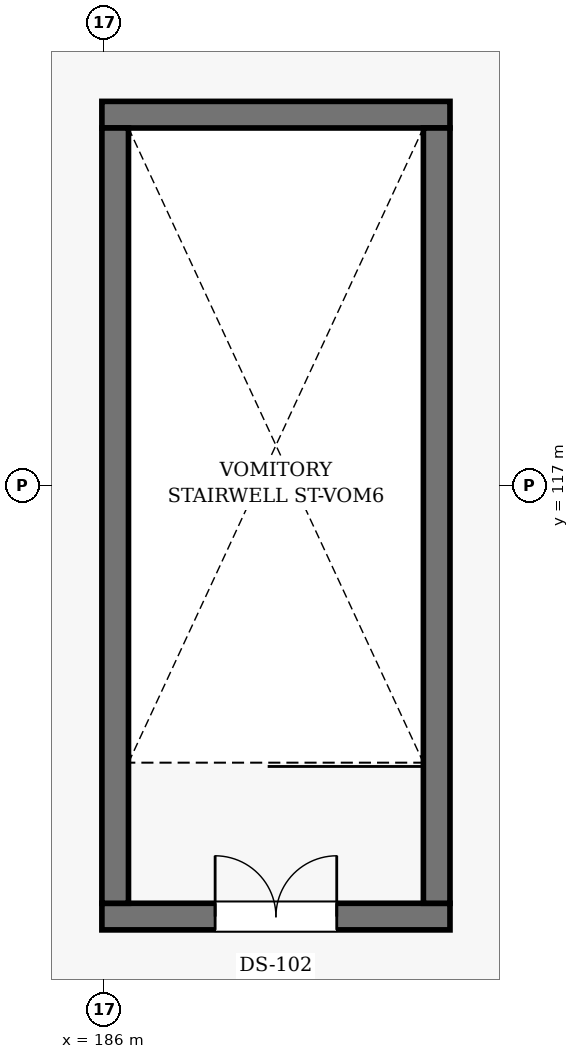
"""IFC4 building model, lengths in metres.
Left out: names, types, materials, properties, quantities, classifications, styles, units other than length and angle.
Written with IfcOpenShell. Run it as: python <this file> out.ifc"""

import sys

from ifc_helpers import new_model, si_unit, direction, frame, frame_2d, origin, place, context, subcontext, project, spatial, rectangle, extrude, element, fill, save


model = new_model("IFC4")
c1 = context("Model", 3, precision=1e-05, world=origin(), true_north=direction((0.0, 1.0)))
c2 = subcontext(c1, "Body", "Model", "MODEL_VIEW")
j1 = project(units=[si_unit("LENGTHUNIT", "METRE"), si_unit("PLANEANGLEUNIT", "RADIAN")], contexts=[c1])
p1 = place(None, origin())
s1 = spatial("IfcSite", under=j1, at=p1, CompositionType="ELEMENT")
p2 = place(p1, origin())
s2 = spatial("IfcBuilding", under=s1, at=p2, CompositionType="ELEMENT")
p3 = place(p2, frame((0.0, 0.0, 5.4)))
s3 = spatial("IfcBuildingStorey", under=s2, at=p3, CompositionType="ELEMENT", Elevation=5.4)
p4 = place(p3, frame((185.97, 111.325, 0.0), z_axis=(0.0, 0.0, 1.0), x_axis=(1.0, 0.0, 0.0)))
e1 = element("IfcWall", 1, at=p4, inside=s3, PredefinedType="SHEAR", context=c2, shape_type="SweptSolid", body=[
    extrude(rectangle(XDim=4.58, YDim=0.35, at=frame_2d((2.29, 0.0))), origin(), (0.0, 0.0, 1.0), 5.4),
])
p5 = place(p4, frame((1.49, 0.0, 0.0)))
e2 = element("IfcOpeningElement", 2, at=p5, cuts=e1, PredefinedType="OPENING", context=c2, shape_type="SweptSolid", body=[
    extrude(rectangle(XDim=1.6, YDim=2.2, at=frame_2d((0.8, 1.1))), frame((0.0, 0.185, 0.0), z_axis=(0.0, -1.0, 0.0), x_axis=(1.0, 0.0, 0.0)), (0.0, 0.0, 1.0), 0.37),
])
p6 = place(p3, frame((190.55, 121.875, 0.0), z_axis=(0.0, 0.0, 1.0), x_axis=(-1.0, 0.0, 0.0)))
e3 = element("IfcWall", 3, at=p6, inside=s3, PredefinedType="SHEAR", context=c2, shape_type="SweptSolid", body=[
    extrude(rectangle(XDim=4.58, YDim=0.35, at=frame_2d((2.29, 0.0))), origin(), (0.0, 0.0, 1.0), 5.4),
])
for number, where, z_axis, x_axis in (
    (4, (186.145, 121.7, 0.0), (0.0, 0.0, 1.0), (0.0, -1.0, 0.0)),
    (5, (190.375, 111.5, 0.0), (0.0, 0.0, 1.0), (0.0, 1.0, 0.0)),
):
    element("IfcWall", number, at=place(p3, frame(where, z_axis=z_axis, x_axis=x_axis)), inside=s3, PredefinedType="SHEAR", context=c2, shape_type="SweptSolid", body=[
        extrude(rectangle(XDim=10.2, YDim=0.35, at=frame_2d((5.1, 0.0))), origin(), (0.0, 0.0, 1.0), 5.4),
    ])
p7 = place(p5, origin())
e6 = element("IfcDoor", 6, at=p7, inside=s3, OperationType="DOUBLE_DOOR_SINGLE_SWING", PredefinedType="DOOR", context=c2, shape_type="SweptSolid", body=[
    extrude(rectangle(XDim=1.6, YDim=2.2, at=frame_2d((0.8, 1.1))), frame((0.0, 0.025, 0.0), z_axis=(0.0, -1.0, 0.0), x_axis=(1.0, 0.0, 0.0)), (0.0, 0.0, 1.0), 0.05),
])
fill(e2, e6)
save(model, sys.argv[1])
